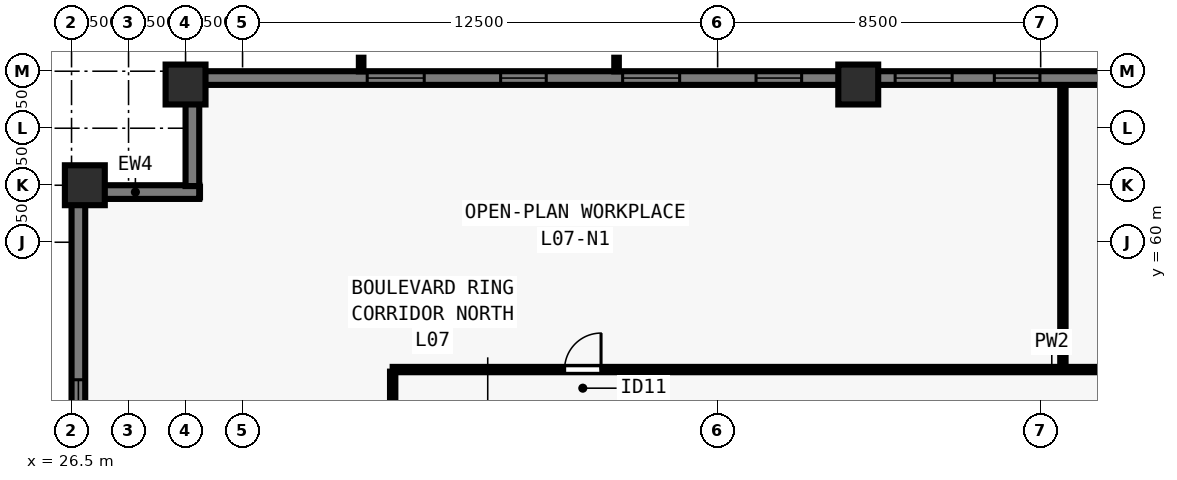
"""IFC4 building model, lengths in metres.
Left out: names, types, materials, properties, quantities, classifications, styles, units other than length and angle.
Written with IfcOpenShell. Run it as: python <this file> out.ifc"""

import sys

from ifc_helpers import new_model, si_unit, direction, frame, frame_2d, origin, origin_2d, place, context, subcontext, project, spatial, rectangle, extrude, element, fill, save


model = new_model("IFC4")
c1 = context("Model", 3, precision=1e-05, world=origin(), true_north=direction((0.0, 1.0)))
c2 = subcontext(c1, "Body", "Model", "MODEL_VIEW")
j1 = project(units=[si_unit("LENGTHUNIT", "METRE"), si_unit("PLANEANGLEUNIT", "RADIAN")], contexts=[c1])
p1 = place(None, origin())
s1 = spatial("IfcSite", under=j1, at=p1, CompositionType="ELEMENT")
p2 = place(p1, origin())
s2 = spatial("IfcBuilding", under=s1, at=p2, CompositionType="ELEMENT")
p3 = place(p2, frame((0.0, 0.0, 30.5)))
s3 = spatial("IfcBuildingStorey", under=s2, at=p3, CompositionType="ELEMENT", Elevation=30.5)
for number, where, z_axis, x_axis in (
    (1, (47.2, 64.15, 0.0), (0.0, 0.0, 1.0), (1.0, 0.0, 0.0)),
    (2, (29.5, 64.15, 0.0), (0.0, 0.0, 1.0), (1.0, 0.0, 0.0)),
    (3, (26.85, 61.5, 0.0), (0.0, 0.0, 1.0), (0.0, 1.0, 0.0)),
):
    element("IfcColumn", number, at=place(p3, frame(where, z_axis=z_axis, x_axis=x_axis)), inside=s3, PredefinedType="COLUMN", context=c2, shape_type="SweptSolid", body=[
        extrude(rectangle(XDim=1.05, YDim=1.05, at=origin_2d()), origin(), (0.0, 0.0, 1.0), 3.5),
    ])
p4 = place(p3, frame((26.68, 16.5, 0.0), z_axis=(0.0, 0.0, 1.0), x_axis=(0.0, 1.0, 0.0)))
e4 = element("IfcWall", 4, at=p4, inside=s3, PredefinedType="SOLIDWALL", context=c2, shape_type="SweptSolid", body=[
    extrude(rectangle(XDim=44.662, YDim=0.36, at=frame_2d((22.331, 0.0))), origin(), (0.0, 0.0, 1.0), 3.28),
])
p5 = place(p4, frame((4.78, 0.0, 0.8)))
e5 = element("IfcOpeningElement", 5, at=p5, cuts=e4, PredefinedType="OPENING", context=c2, shape_type="SweptSolid", body=[
    extrude(rectangle(XDim=1.5, YDim=1.544, at=frame_2d((0.75, 0.772))), frame((0.0, 0.19, 0.0), z_axis=(0.0, -1.0, 0.0), x_axis=(1.0, 0.0, 0.0)), (0.0, 0.0, 1.0), 0.38),
])
p6 = place(p4, frame((8.29, 0.0, 0.8)))
e6 = element("IfcOpeningElement", 6, at=p6, cuts=e4, PredefinedType="OPENING", context=c2, shape_type="SweptSolid", body=[
    extrude(rectangle(XDim=1.2, YDim=1.544, at=frame_2d((0.6, 0.772))), frame((0.0, 0.19, 0.0), z_axis=(0.0, -1.0, 0.0), x_axis=(1.0, 0.0, 0.0)), (0.0, 0.0, 1.0), 0.38),
])
p7 = place(p4, frame((11.5, 0.0, 0.8)))
e7 = element("IfcOpeningElement", 7, at=p7, cuts=e4, PredefinedType="OPENING", context=c2, shape_type="SweptSolid", body=[
    extrude(rectangle(XDim=1.5, YDim=1.544, at=frame_2d((0.75, 0.772))), frame((0.0, 0.19, 0.0), z_axis=(0.0, -1.0, 0.0), x_axis=(1.0, 0.0, 0.0)), (0.0, 0.0, 1.0), 0.38),
])
p8 = place(p4, frame((14.561, 0.0, 0.8)))
e8 = element("IfcOpeningElement", 8, at=p8, cuts=e4, PredefinedType="OPENING", context=c2, shape_type="SweptSolid", body=[
    extrude(rectangle(XDim=1.2, YDim=1.544, at=frame_2d((0.6, 0.772))), frame((0.0, 0.19, 0.0), z_axis=(0.0, -1.0, 0.0), x_axis=(1.0, 0.0, 0.0)), (0.0, 0.0, 1.0), 0.38),
])
p9 = place(p4, frame((18.671, 0.0, 0.8)))
e9 = element("IfcOpeningElement", 9, at=p9, cuts=e4, PredefinedType="OPENING", context=c2, shape_type="SweptSolid", body=[
    extrude(rectangle(XDim=1.5, YDim=1.544, at=frame_2d((0.75, 0.772))), frame((0.0, 0.19, 0.0), z_axis=(0.0, -1.0, 0.0), x_axis=(1.0, 0.0, 0.0)), (0.0, 0.0, 1.0), 0.38),
])
p10 = place(p4, frame((21.731, 0.0, 0.8)))
e10 = element("IfcOpeningElement", 10, at=p10, cuts=e4, PredefinedType="OPENING", context=c2, shape_type="SweptSolid", body=[
    extrude(rectangle(XDim=1.2, YDim=1.544, at=frame_2d((0.6, 0.772))), frame((0.0, 0.19, 0.0), z_axis=(0.0, -1.0, 0.0), x_axis=(1.0, 0.0, 0.0)), (0.0, 0.0, 1.0), 0.38),
])
p11 = place(p4, frame((24.941, 0.0, 0.8)))
e11 = element("IfcOpeningElement", 11, at=p11, cuts=e4, PredefinedType="OPENING", context=c2, shape_type="SweptSolid", body=[
    extrude(rectangle(XDim=1.5, YDim=1.544, at=frame_2d((0.75, 0.772))), frame((0.0, 0.19, 0.0), z_axis=(0.0, -1.0, 0.0), x_axis=(1.0, 0.0, 0.0)), (0.0, 0.0, 1.0), 0.38),
])
p12 = place(p4, frame((29.302, 0.0, 0.8)))
e12 = element("IfcOpeningElement", 12, at=p12, cuts=e4, PredefinedType="OPENING", context=c2, shape_type="SweptSolid", body=[
    extrude(rectangle(XDim=1.2, YDim=1.544, at=frame_2d((0.6, 0.772))), frame((0.0, 0.19, 0.0), z_axis=(0.0, -1.0, 0.0), x_axis=(1.0, 0.0, 0.0)), (0.0, 0.0, 1.0), 0.38),
])
p13 = place(p4, frame((31.662, 0.0, 0.8)))
e13 = element("IfcOpeningElement", 13, at=p13, cuts=e4, PredefinedType="OPENING", context=c2, shape_type="SweptSolid", body=[
    extrude(rectangle(XDim=1.5, YDim=1.544, at=frame_2d((0.75, 0.772))), frame((0.0, 0.19, 0.0), z_axis=(0.0, -1.0, 0.0), x_axis=(1.0, 0.0, 0.0)), (0.0, 0.0, 1.0), 0.38),
])
p14 = place(p4, frame((35.172, 0.0, 0.8)))
e14 = element("IfcOpeningElement", 14, at=p14, cuts=e4, PredefinedType="OPENING", context=c2, shape_type="SweptSolid", body=[
    extrude(rectangle(XDim=1.2, YDim=1.544, at=frame_2d((0.6, 0.772))), frame((0.0, 0.19, 0.0), z_axis=(0.0, -1.0, 0.0), x_axis=(1.0, 0.0, 0.0)), (0.0, 0.0, 1.0), 0.38),
])
p15 = place(p4, frame((38.382, 0.0, 0.8)))
e15 = element("IfcOpeningElement", 15, at=p15, cuts=e4, PredefinedType="OPENING", context=c2, shape_type="SweptSolid", body=[
    extrude(rectangle(XDim=1.5, YDim=1.544, at=frame_2d((0.75, 0.772))), frame((0.0, 0.19, 0.0), z_axis=(0.0, -1.0, 0.0), x_axis=(1.0, 0.0, 0.0)), (0.0, 0.0, 1.0), 0.38),
])
p16 = place(p3, frame((26.5, 61.32, 0.0), z_axis=(0.0, 0.0, 1.0), x_axis=(1.0, 0.0, 0.0)))
e16 = element("IfcWall", 16, at=p16, inside=s3, PredefinedType="SOLIDWALL", context=c2, shape_type="SweptSolid", body=[
    extrude(rectangle(XDim=3.36, YDim=0.36, at=frame_2d((1.68, 0.0))), origin(), (0.0, 0.0, 1.0), 3.28),
])
p17 = place(p3, frame((29.68, 61.478, 0.0), z_axis=(0.0, 0.0, 1.0), x_axis=(0.0, 1.0, 0.0)))
e17 = element("IfcWall", 17, at=p17, inside=s3, PredefinedType="SOLIDWALL", context=c2, shape_type="SweptSolid", body=[
    extrude(rectangle(XDim=2.684, YDim=0.36, at=frame_2d((1.342, 0.0))), origin(), (0.0, 0.0, 1.0), 3.28),
])
p18 = place(p3, frame((29.5, 64.32, 0.0), z_axis=(0.0, 0.0, 1.0), x_axis=(1.0, 0.0, 0.0)))
e18 = element("IfcWall", 18, at=p18, inside=s3, PredefinedType="SOLIDWALL", context=c2, shape_type="SweptSolid", body=[
    extrude(rectangle(XDim=44.662, YDim=0.36, at=frame_2d((22.331, 0.0))), origin(), (0.0, 0.0, 1.0), 3.28),
])
p19 = place(p18, frame((4.78, 0.0, 0.8)))
e19 = element("IfcOpeningElement", 19, at=p19, cuts=e18, PredefinedType="OPENING", context=c2, shape_type="SweptSolid", body=[
    extrude(rectangle(XDim=1.5, YDim=1.544, at=frame_2d((0.75, 0.772))), frame((0.0, 0.19, 0.0), z_axis=(0.0, -1.0, 0.0), x_axis=(1.0, 0.0, 0.0)), (0.0, 0.0, 1.0), 0.38),
])
p20 = place(p18, frame((8.29, 0.0, 0.8)))
e20 = element("IfcOpeningElement", 20, at=p20, cuts=e18, PredefinedType="OPENING", context=c2, shape_type="SweptSolid", body=[
    extrude(rectangle(XDim=1.2, YDim=1.544, at=frame_2d((0.6, 0.772))), frame((0.0, 0.19, 0.0), z_axis=(0.0, -1.0, 0.0), x_axis=(1.0, 0.0, 0.0)), (0.0, 0.0, 1.0), 0.38),
])
p21 = place(p18, frame((11.5, 0.0, 0.8)))
e21 = element("IfcOpeningElement", 21, at=p21, cuts=e18, PredefinedType="OPENING", context=c2, shape_type="SweptSolid", body=[
    extrude(rectangle(XDim=1.5, YDim=1.544, at=frame_2d((0.75, 0.772))), frame((0.0, 0.19, 0.0), z_axis=(0.0, -1.0, 0.0), x_axis=(1.0, 0.0, 0.0)), (0.0, 0.0, 1.0), 0.38),
])
p22 = place(p18, frame((15.01, 0.0, 0.8)))
e22 = element("IfcOpeningElement", 22, at=p22, cuts=e18, PredefinedType="OPENING", context=c2, shape_type="SweptSolid", body=[
    extrude(rectangle(XDim=1.2, YDim=1.544, at=frame_2d((0.6, 0.772))), frame((0.0, 0.19, 0.0), z_axis=(0.0, -1.0, 0.0), x_axis=(1.0, 0.0, 0.0)), (0.0, 0.0, 1.0), 0.38),
])
p23 = place(p18, frame((18.671, 0.0, 0.8)))
e23 = element("IfcOpeningElement", 23, at=p23, cuts=e18, PredefinedType="OPENING", context=c2, shape_type="SweptSolid", body=[
    extrude(rectangle(XDim=1.5, YDim=1.544, at=frame_2d((0.75, 0.772))), frame((0.0, 0.19, 0.0), z_axis=(0.0, -1.0, 0.0), x_axis=(1.0, 0.0, 0.0)), (0.0, 0.0, 1.0), 0.38),
])
p24 = place(p18, frame((21.281, 0.0, 0.8)))
e24 = element("IfcOpeningElement", 24, at=p24, cuts=e18, PredefinedType="OPENING", context=c2, shape_type="SweptSolid", body=[
    extrude(rectangle(XDim=1.2, YDim=1.544, at=frame_2d((0.6, 0.772))), frame((0.0, 0.19, 0.0), z_axis=(0.0, -1.0, 0.0), x_axis=(1.0, 0.0, 0.0)), (0.0, 0.0, 1.0), 0.38),
])
p25 = place(p18, frame((24.941, 0.0, 0.8)))
e25 = element("IfcOpeningElement", 25, at=p25, cuts=e18, PredefinedType="OPENING", context=c2, shape_type="SweptSolid", body=[
    extrude(rectangle(XDim=1.5, YDim=1.544, at=frame_2d((0.75, 0.772))), frame((0.0, 0.19, 0.0), z_axis=(0.0, -1.0, 0.0), x_axis=(1.0, 0.0, 0.0)), (0.0, 0.0, 1.0), 0.38),
])
p26 = place(p18, frame((28.451, 0.0, 0.8)))
e26 = element("IfcOpeningElement", 26, at=p26, cuts=e18, PredefinedType="OPENING", context=c2, shape_type="SweptSolid", body=[
    extrude(rectangle(XDim=1.2, YDim=1.544, at=frame_2d((0.6, 0.772))), frame((0.0, 0.19, 0.0), z_axis=(0.0, -1.0, 0.0), x_axis=(1.0, 0.0, 0.0)), (0.0, 0.0, 1.0), 0.38),
])
p27 = place(p18, frame((31.662, 0.0, 0.8)))
e27 = element("IfcOpeningElement", 27, at=p27, cuts=e18, PredefinedType="OPENING", context=c2, shape_type="SweptSolid", body=[
    extrude(rectangle(XDim=1.5, YDim=1.544, at=frame_2d((0.75, 0.772))), frame((0.0, 0.19, 0.0), z_axis=(0.0, -1.0, 0.0), x_axis=(1.0, 0.0, 0.0)), (0.0, 0.0, 1.0), 0.38),
])
p28 = place(p18, frame((35.172, 0.0, 0.8)))
e28 = element("IfcOpeningElement", 28, at=p28, cuts=e18, PredefinedType="OPENING", context=c2, shape_type="SweptSolid", body=[
    extrude(rectangle(XDim=1.2, YDim=1.544, at=frame_2d((0.6, 0.772))), frame((0.0, 0.19, 0.0), z_axis=(0.0, -1.0, 0.0), x_axis=(1.0, 0.0, 0.0)), (0.0, 0.0, 1.0), 0.38),
])
p29 = place(p18, frame((38.382, 0.0, 0.8)))
e29 = element("IfcOpeningElement", 29, at=p29, cuts=e18, PredefinedType="OPENING", context=c2, shape_type="SweptSolid", body=[
    extrude(rectangle(XDim=1.5, YDim=1.544, at=frame_2d((0.75, 0.772))), frame((0.0, 0.19, 0.0), z_axis=(0.0, -1.0, 0.0), x_axis=(1.0, 0.0, 0.0)), (0.0, 0.0, 1.0), 0.38),
])
p30 = place(p3, frame((34.95, 56.65, 0.0), z_axis=(0.0, 0.0, 1.0), x_axis=(1.0, 0.0, 0.0)))
e30 = element("IfcWall", 30, at=p30, inside=s3, PredefinedType="PARTITIONING", context=c2, shape_type="SweptSolid", body=[
    extrude(rectangle(XDim=34.1, YDim=0.14, at=frame_2d((17.05, 0.0))), origin(), (0.0, 0.0, 1.0), 3.28),
])
p31 = place(p30, frame((4.522, 0.0, 0.0)))
e31 = element("IfcOpeningElement", 31, at=p31, cuts=e30, PredefinedType="OPENING", context=c2, shape_type="SweptSolid", body=[
    extrude(rectangle(XDim=0.96, YDim=2.12, at=frame_2d((0.48, 1.06))), frame((0.0, 0.08, 0.0), z_axis=(0.0, -1.0, 0.0), x_axis=(1.0, 0.0, 0.0)), (0.0, 0.0, 1.0), 0.16),
])
p32 = place(p30, frame((29.202, 0.0, 0.0)))
e32 = element("IfcOpeningElement", 32, at=p32, cuts=e30, PredefinedType="OPENING", context=c2, shape_type="SweptSolid", body=[
    extrude(rectangle(XDim=0.96, YDim=2.12, at=frame_2d((0.48, 1.06))), frame((0.0, 0.08, 0.0), z_axis=(0.0, -1.0, 0.0), x_axis=(1.0, 0.0, 0.0)), (0.0, 0.0, 1.0), 0.16),
])
p33 = place(p3, frame((34.95, 21.405, 0.0), z_axis=(0.0, 0.0, 1.0), x_axis=(0.0, 1.0, 0.0)))
e33 = element("IfcWall", 33, at=p33, inside=s3, PredefinedType="PARTITIONING", context=c2, shape_type="SweptSolid", body=[
    extrude(rectangle(XDim=35.19, YDim=0.14, at=frame_2d((17.595, 0.0))), origin(), (0.0, 0.0, 1.0), 3.28),
])
p34 = place(p33, frame((5.21, 0.0, 0.0)))
e34 = element("IfcOpeningElement", 34, at=p34, cuts=e33, PredefinedType="OPENING", context=c2, shape_type="SweptSolid", body=[
    extrude(rectangle(XDim=0.96, YDim=2.12, at=frame_2d((0.48, 1.06))), frame((0.0, 0.08, 0.0), z_axis=(0.0, -1.0, 0.0), x_axis=(1.0, 0.0, 0.0)), (0.0, 0.0, 1.0), 0.16),
])
p35 = place(p33, frame((17.052, 0.0, 0.0)))
e35 = element("IfcOpeningElement", 35, at=p35, cuts=e33, PredefinedType="OPENING", context=c2, shape_type="SweptSolid", body=[
    extrude(rectangle(XDim=0.96, YDim=2.12, at=frame_2d((0.48, 1.06))), frame((0.0, 0.08, 0.0), z_axis=(0.0, -1.0, 0.0), x_axis=(1.0, 0.0, 0.0)), (0.0, 0.0, 1.0), 0.16),
])
p36 = place(p33, frame((28.957, 0.0, 0.0)))
e36 = element("IfcOpeningElement", 36, at=p36, cuts=e33, PredefinedType="OPENING", context=c2, shape_type="SweptSolid", body=[
    extrude(rectangle(XDim=0.96, YDim=2.12, at=frame_2d((0.48, 1.06))), frame((0.0, 0.08, 0.0), z_axis=(0.0, -1.0, 0.0), x_axis=(1.0, 0.0, 0.0)), (0.0, 0.0, 1.0), 0.16),
])
p37 = place(p3, frame((52.585, 56.75, 0.0), z_axis=(0.0, 0.0, 1.0), x_axis=(0.0, 1.0, 0.0)))
e37 = element("IfcWall", 37, at=p37, inside=s3, PredefinedType="PARTITIONING", context=c2, shape_type="SweptSolid", body=[
    extrude(rectangle(XDim=7.33, YDim=0.14, at=frame_2d((3.665, 0.0))), origin(), (0.0, 0.0, 1.0), 2.849),
])
p38 = place(p15, origin())
e38 = element("IfcWindow", 38, at=p38, inside=s3, PartitioningType="SINGLE_PANEL", PredefinedType="WINDOW", context=c2, shape_type="SweptSolid", body=[
    extrude(rectangle(XDim=1.5, YDim=1.544, at=frame_2d((0.75, 0.772))), frame((0.0, -0.05, 0.0), z_axis=(0.0, -1.0, 0.0), x_axis=(1.0, 0.0, 0.0)), (0.0, 0.0, 1.0), 0.06),
])
fill(e15, e38)
p39 = place(p19, origin())
e39 = element("IfcWindow", 39, at=p39, inside=s3, PartitioningType="SINGLE_PANEL", PredefinedType="WINDOW", context=c2, shape_type="SweptSolid", body=[
    extrude(rectangle(XDim=1.5, YDim=1.544, at=frame_2d((0.75, 0.772))), frame((0.0, -0.05, 0.0), z_axis=(0.0, -1.0, 0.0), x_axis=(1.0, 0.0, 0.0)), (0.0, 0.0, 1.0), 0.06),
])
fill(e19, e39)
p40 = place(p20, origin())
e40 = element("IfcWindow", 40, at=p40, inside=s3, PartitioningType="SINGLE_PANEL", PredefinedType="WINDOW", context=c2, shape_type="SweptSolid", body=[
    extrude(rectangle(XDim=1.2, YDim=1.544, at=frame_2d((0.6, 0.772))), frame((0.0, -0.05, 0.0), z_axis=(0.0, -1.0, 0.0), x_axis=(1.0, 0.0, 0.0)), (0.0, 0.0, 1.0), 0.06),
])
fill(e20, e40)
p41 = place(p21, origin())
e41 = element("IfcWindow", 41, at=p41, inside=s3, PartitioningType="SINGLE_PANEL", PredefinedType="WINDOW", context=c2, shape_type="SweptSolid", body=[
    extrude(rectangle(XDim=1.5, YDim=1.544, at=frame_2d((0.75, 0.772))), frame((0.0, -0.05, 0.0), z_axis=(0.0, -1.0, 0.0), x_axis=(1.0, 0.0, 0.0)), (0.0, 0.0, 1.0), 0.06),
])
fill(e21, e41)
p42 = place(p22, origin())
e42 = element("IfcWindow", 42, at=p42, inside=s3, PartitioningType="SINGLE_PANEL", PredefinedType="WINDOW", context=c2, shape_type="SweptSolid", body=[
    extrude(rectangle(XDim=1.2, YDim=1.544, at=frame_2d((0.6, 0.772))), frame((0.0, -0.05, 0.0), z_axis=(0.0, -1.0, 0.0), x_axis=(1.0, 0.0, 0.0)), (0.0, 0.0, 1.0), 0.06),
])
fill(e22, e42)
p43 = place(p23, origin())
e43 = element("IfcWindow", 43, at=p43, inside=s3, PartitioningType="SINGLE_PANEL", PredefinedType="WINDOW", context=c2, shape_type="SweptSolid", body=[
    extrude(rectangle(XDim=1.5, YDim=1.544, at=frame_2d((0.75, 0.772))), frame((0.0, -0.05, 0.0), z_axis=(0.0, -1.0, 0.0), x_axis=(1.0, 0.0, 0.0)), (0.0, 0.0, 1.0), 0.06),
])
fill(e23, e43)
p44 = place(p24, origin())
e44 = element("IfcWindow", 44, at=p44, inside=s3, PartitioningType="SINGLE_PANEL", PredefinedType="WINDOW", context=c2, shape_type="SweptSolid", body=[
    extrude(rectangle(XDim=1.2, YDim=1.544, at=frame_2d((0.6, 0.772))), frame((0.0, -0.05, 0.0), z_axis=(0.0, -1.0, 0.0), x_axis=(1.0, 0.0, 0.0)), (0.0, 0.0, 1.0), 0.06),
])
fill(e24, e44)
p45 = place(p31, origin())
e45 = element("IfcDoor", 45, at=p45, inside=s3, OperationType="SINGLE_SWING_RIGHT", PredefinedType="DOOR", context=c2, shape_type="SweptSolid", body=[
    extrude(rectangle(XDim=0.96, YDim=2.12, at=frame_2d((0.48, 1.06))), frame((0.0, 0.025, 0.0), z_axis=(0.0, -1.0, 0.0), x_axis=(1.0, 0.0, 0.0)), (0.0, 0.0, 1.0), 0.05),
])
fill(e31, e45)
save(model, sys.argv[1])
